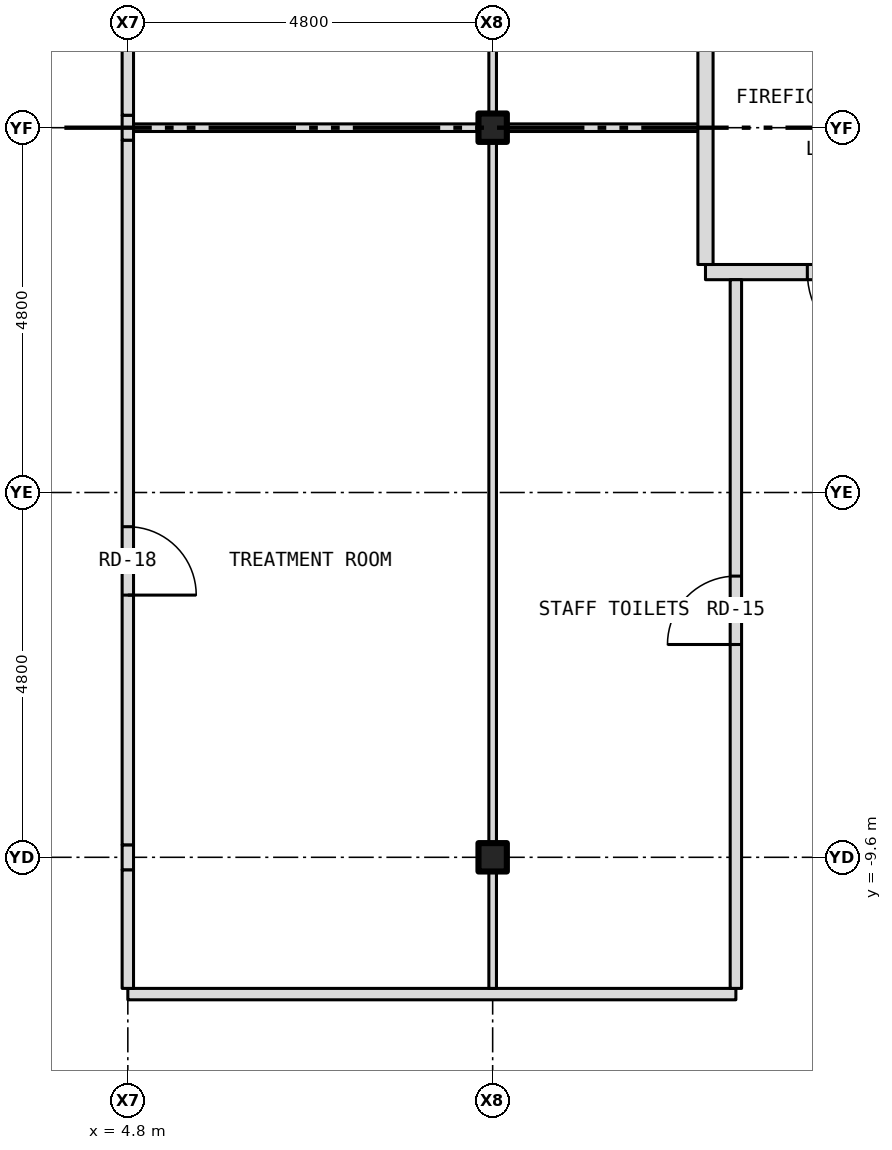
"""IFC4 building model, lengths in metres.
Left out: names, types, materials, properties, quantities, classifications, styles, units other than length and angle.
Written with IfcOpenShell. Run it as: python <this file> out.ifc"""

import sys

from ifc_helpers import new_model, si_unit, direction, frame, frame_2d, origin, origin_2d, place, context, subcontext, project, spatial, rectangle, i_section, extrude, element, fill, save


model = new_model("IFC4")
c1 = context("Model", 3, precision=1e-05, world=origin(), true_north=direction((0.0, 1.0)))
c2 = subcontext(c1, "Body", "Model", "MODEL_VIEW")
j1 = project(units=[si_unit("LENGTHUNIT", "METRE"), si_unit("PLANEANGLEUNIT", "RADIAN")], contexts=[c1])
p1 = place(None, origin())
s1 = spatial("IfcSite", under=j1, at=p1, CompositionType="ELEMENT")
p2 = place(p1, origin())
s2 = spatial("IfcBuilding", under=s1, at=p2, CompositionType="ELEMENT")
p3 = place(p2, frame((0.0, 0.0, 155.0)))
s3 = spatial("IfcBuildingStorey", under=s2, at=p3, CompositionType="ELEMENT", Elevation=155.0)
for number, where, z_axis, x_axis in (
    (1, (9.6, -9.6, -0.15), (0.0, 0.0, 1.0), (1.0, 0.0, 0.0)),
    (2, (9.6, 0.0, -0.15), (0.0, 0.0, 1.0), (1.0, 0.0, 0.0)),
):
    element("IfcColumn", number, at=place(p3, frame(where, z_axis=z_axis, x_axis=x_axis)), inside=s3, PredefinedType="COLUMN", context=c2, shape_type="SweptSolid", body=[
        extrude(i_section(OverallWidth=0.373, OverallDepth=0.373, WebThickness=0.016, FlangeThickness=0.026, at=origin_2d()), origin(), (0.0, 0.0, 1.0), 3.5),
    ])
p4 = place(p3, frame((4.8, -11.4, 0.0), z_axis=(0.0, 0.0, 1.0), x_axis=(1.0, 0.0, 0.0)))
e3 = element("IfcWall", 3, at=p4, inside=s3, PredefinedType="PARTITIONING", context=c2, shape_type="SweptSolid", body=[
    extrude(rectangle(XDim=8.0, YDim=0.15, at=frame_2d((4.0, 0.0))), origin(), (0.0, 0.0, 1.0), 3.35),
])
p5 = place(p3, frame((12.4, -1.9, 0.0), z_axis=(0.0, 0.0, 1.0), x_axis=(1.0, 0.0, 0.0)))
e4 = element("IfcWall", 4, at=p5, inside=s3, PredefinedType="PARTITIONING", context=c2, shape_type="SweptSolid", body=[
    extrude(rectangle(XDim=3.28, YDim=0.2, at=frame_2d((1.64, 0.0))), origin(), (0.0, 0.0, 1.0), 3.35),
])
p6 = place(p5, frame((1.34, 0.0, 0.0)))
e5 = element("IfcOpeningElement", 5, at=p6, cuts=e4, PredefinedType="OPENING", context=c2, shape_type="SweptSolid", body=[
    extrude(rectangle(XDim=1.1, YDim=2.1, at=frame_2d((0.55, 1.05))), frame((0.0, 0.112, 0.0), z_axis=(0.0, -1.0, 0.0), x_axis=(1.0, 0.0, 0.0)), (0.0, 0.0, 1.0), 0.224),
])
p7 = place(p3, frame((4.8, 0.0, 0.0), z_axis=(0.0, 0.0, 1.0), x_axis=(1.0, 0.0, 0.0)))
e6 = element("IfcWall", 6, at=p7, inside=s3, PredefinedType="PARTITIONING", context=c2, shape_type="SweptSolid", body=[
    extrude(rectangle(XDim=4.613, YDim=0.1, at=frame_2d((2.307, 0.0))), origin(), (0.0, 0.0, 1.0), 2.728),
])
p8 = place(p3, frame((9.413, 0.0, 0.0), z_axis=(0.0, 0.0, 1.0), x_axis=(1.0, 0.0, 0.0)))
e7 = element("IfcWall", 7, at=p8, inside=s3, PredefinedType="PARTITIONING", context=c2, shape_type="SweptSolid", body=[
    extrude(rectangle(XDim=0.374, YDim=0.1, at=frame_2d((0.187, 0.0))), origin(), (0.0, 0.0, 1.0), 3.35),
])
p9 = place(p3, frame((9.787, 0.0, 0.0), z_axis=(0.0, 0.0, 1.0), x_axis=(1.0, 0.0, 0.0)))
e8 = element("IfcWall", 8, at=p9, inside=s3, PredefinedType="PARTITIONING", context=c2, shape_type="SweptSolid", body=[
    extrude(rectangle(XDim=2.613, YDim=0.1, at=frame_2d((1.306, 0.0))), origin(), (0.0, 0.0, 1.0), 2.728),
])
p10 = place(p3, frame((4.8, -11.325, 0.0), z_axis=(0.0, 0.0, 1.0), x_axis=(0.0, 1.0, 0.0)))
e9 = element("IfcWall", 9, at=p10, inside=s3, PredefinedType="PARTITIONING", context=c2, shape_type="SweptSolid", body=[
    extrude(rectangle(XDim=1.561, YDim=0.15, at=frame_2d((0.781, 0.0))), origin(), (0.0, 0.0, 1.0), 2.817),
])
p11 = place(p3, frame((4.8, -9.764, 0.0), z_axis=(0.0, 0.0, 1.0), x_axis=(0.0, 1.0, 0.0)))
e10 = element("IfcWall", 10, at=p11, inside=s3, PredefinedType="PARTITIONING", context=c2, shape_type="SweptSolid", body=[
    extrude(rectangle(XDim=0.328, YDim=0.15, at=frame_2d((0.164, 0.0))), origin(), (0.0, 0.0, 1.0), 3.35),
])
p12 = place(p3, frame((4.8, -9.436, 0.0), z_axis=(0.0, 0.0, 1.0), x_axis=(0.0, 1.0, 0.0)))
e11 = element("IfcWall", 11, at=p12, inside=s3, PredefinedType="PARTITIONING", context=c2, shape_type="SweptSolid", body=[
    extrude(rectangle(XDim=9.272, YDim=0.15, at=frame_2d((4.636, 0.0))), origin(), (0.0, 0.0, 1.0), 2.817),
])
p13 = place(p12, frame((3.286, 0.0, 0.0)))
e12 = element("IfcOpeningElement", 12, at=p13, cuts=e11, PredefinedType="OPENING", context=c2, shape_type="SweptSolid", body=[
    extrude(rectangle(XDim=0.9, YDim=2.1, at=frame_2d((0.45, 1.05))), frame((0.0, 0.087, 0.0), z_axis=(0.0, -1.0, 0.0), x_axis=(1.0, 0.0, 0.0)), (0.0, 0.0, 1.0), 0.174),
])
p14 = place(p3, frame((4.8, -0.164, 0.0), z_axis=(0.0, 0.0, 1.0), x_axis=(0.0, 1.0, 0.0)))
e13 = element("IfcWall", 13, at=p14, inside=s3, PredefinedType="PARTITIONING", context=c2, shape_type="SweptSolid", body=[
    extrude(rectangle(XDim=0.328, YDim=0.15, at=frame_2d((0.164, 0.0))), origin(), (0.0, 0.0, 1.0), 3.35),
])
p15 = place(p3, frame((4.8, 0.164, 0.0), z_axis=(0.0, 0.0, 1.0), x_axis=(0.0, 1.0, 0.0)))
e14 = element("IfcWall", 14, at=p15, inside=s3, PredefinedType="PARTITIONING", context=c2, shape_type="SweptSolid", body=[
    extrude(rectangle(XDim=5.661, YDim=0.15, at=frame_2d((2.831, 0.0))), origin(), (0.0, 0.0, 1.0), 2.817),
])
p16 = place(p15, frame((2.336, 0.0, 0.0)))
e15 = element("IfcOpeningElement", 15, at=p16, cuts=e14, PredefinedType="OPENING", context=c2, shape_type="SweptSolid", body=[
    extrude(rectangle(XDim=0.9, YDim=2.1, at=frame_2d((0.45, 1.05))), frame((0.0, 0.087, 0.0), z_axis=(0.0, -1.0, 0.0), x_axis=(1.0, 0.0, 0.0)), (0.0, 0.0, 1.0), 0.174),
])
p17 = place(p3, frame((9.6, -11.325, 0.0), z_axis=(0.0, 0.0, 1.0), x_axis=(0.0, 1.0, 0.0)))
e16 = element("IfcWall", 16, at=p17, inside=s3, PredefinedType="PARTITIONING", context=c2, shape_type="SweptSolid", body=[
    extrude(rectangle(XDim=1.538, YDim=0.1, at=frame_2d((0.769, 0.0))), origin(), (0.0, 0.0, 1.0), 2.728),
])
p18 = place(p3, frame((9.6, -9.787, 0.0), z_axis=(0.0, 0.0, 1.0), x_axis=(0.0, 1.0, 0.0)))
e17 = element("IfcWall", 17, at=p18, inside=s3, PredefinedType="PARTITIONING", context=c2, shape_type="SweptSolid", body=[
    extrude(rectangle(XDim=0.374, YDim=0.1, at=frame_2d((0.187, 0.0))), origin(), (0.0, 0.0, 1.0), 3.35),
])
p19 = place(p3, frame((9.6, -9.413, 0.0), z_axis=(0.0, 0.0, 1.0), x_axis=(0.0, 1.0, 0.0)))
e18 = element("IfcWall", 18, at=p19, inside=s3, PredefinedType="PARTITIONING", context=c2, shape_type="SweptSolid", body=[
    extrude(rectangle(XDim=9.363, YDim=0.1, at=frame_2d((4.682, 0.0))), origin(), (0.0, 0.0, 1.0), 2.728),
])
p20 = place(p3, frame((9.6, 0.05, 0.0), z_axis=(0.0, 0.0, 1.0), x_axis=(0.0, 1.0, 0.0)))
e19 = element("IfcWall", 19, at=p20, inside=s3, PredefinedType="PARTITIONING", context=c2, shape_type="SweptSolid", body=[
    extrude(rectangle(XDim=5.775, YDim=0.1, at=frame_2d((2.887, 0.0))), origin(), (0.0, 0.0, 1.0), 2.728),
])
p21 = place(p3, frame((12.4, -1.8, 0.0), z_axis=(0.0, 0.0, 1.0), x_axis=(0.0, 1.0, 0.0)))
e20 = element("IfcWall", 20, at=p21, inside=s3, PredefinedType="PARTITIONING", context=c2, shape_type="SweptSolid", body=[
    extrude(rectangle(XDim=4.0, YDim=0.2, at=frame_2d((2.0, 0.0))), origin(), (0.0, 0.0, 1.0), 3.35),
])
p22 = place(p3, frame((12.8, -11.325, 0.0), z_axis=(0.0, 0.0, 1.0), x_axis=(0.0, 1.0, 0.0)))
e21 = element("IfcWall", 21, at=p22, inside=s3, PredefinedType="PARTITIONING", context=c2, shape_type="SweptSolid", body=[
    extrude(rectangle(XDim=9.325, YDim=0.15, at=frame_2d((4.663, 0.0))), origin(), (0.0, 0.0, 1.0), 3.35),
])
p23 = place(p22, frame((4.525, 0.0, 0.0)))
e22 = element("IfcOpeningElement", 22, at=p23, cuts=e21, PredefinedType="OPENING", context=c2, shape_type="SweptSolid", body=[
    extrude(rectangle(XDim=0.9, YDim=2.1, at=frame_2d((0.45, 1.05))), frame((0.0, 0.087, 0.0), z_axis=(0.0, -1.0, 0.0), x_axis=(1.0, 0.0, 0.0)), (0.0, 0.0, 1.0), 0.174),
])
p24 = place(p6, origin())
e23 = element("IfcDoor", 23, at=p24, inside=s3, OperationType="SINGLE_SWING_RIGHT", PredefinedType="DOOR", context=c2, shape_type="SweptSolid", body=[
    extrude(rectangle(XDim=1.1, YDim=2.1, at=frame_2d((0.55, 1.05))), frame((0.0, 0.025, 0.0), z_axis=(0.0, -1.0, 0.0), x_axis=(1.0, 0.0, 0.0)), (0.0, 0.0, 1.0), 0.05),
])
fill(e5, e23)
p25 = place(p23, origin())
e24 = element("IfcDoor", 24, at=p25, inside=s3, OperationType="SINGLE_SWING_LEFT", PredefinedType="DOOR", context=c2, shape_type="SweptSolid", body=[
    extrude(rectangle(XDim=0.9, YDim=2.1, at=frame_2d((0.45, 1.05))), frame((0.0, 0.025, 0.0), z_axis=(0.0, -1.0, 0.0), x_axis=(1.0, 0.0, 0.0)), (0.0, 0.0, 1.0), 0.05),
])
fill(e22, e24)
p26 = place(p13, origin())
e25 = element("IfcDoor", 25, at=p26, inside=s3, OperationType="SINGLE_SWING_LEFT", PredefinedType="DOOR", context=c2, shape_type="SweptSolid", body=[
    extrude(rectangle(XDim=0.9, YDim=2.1, at=frame_2d((0.45, 1.05))), frame((0.0, 0.025, 0.0), z_axis=(0.0, -1.0, 0.0), x_axis=(1.0, 0.0, 0.0)), (0.0, 0.0, 1.0), 0.05),
])
fill(e12, e25)
save(model, sys.argv[1])
